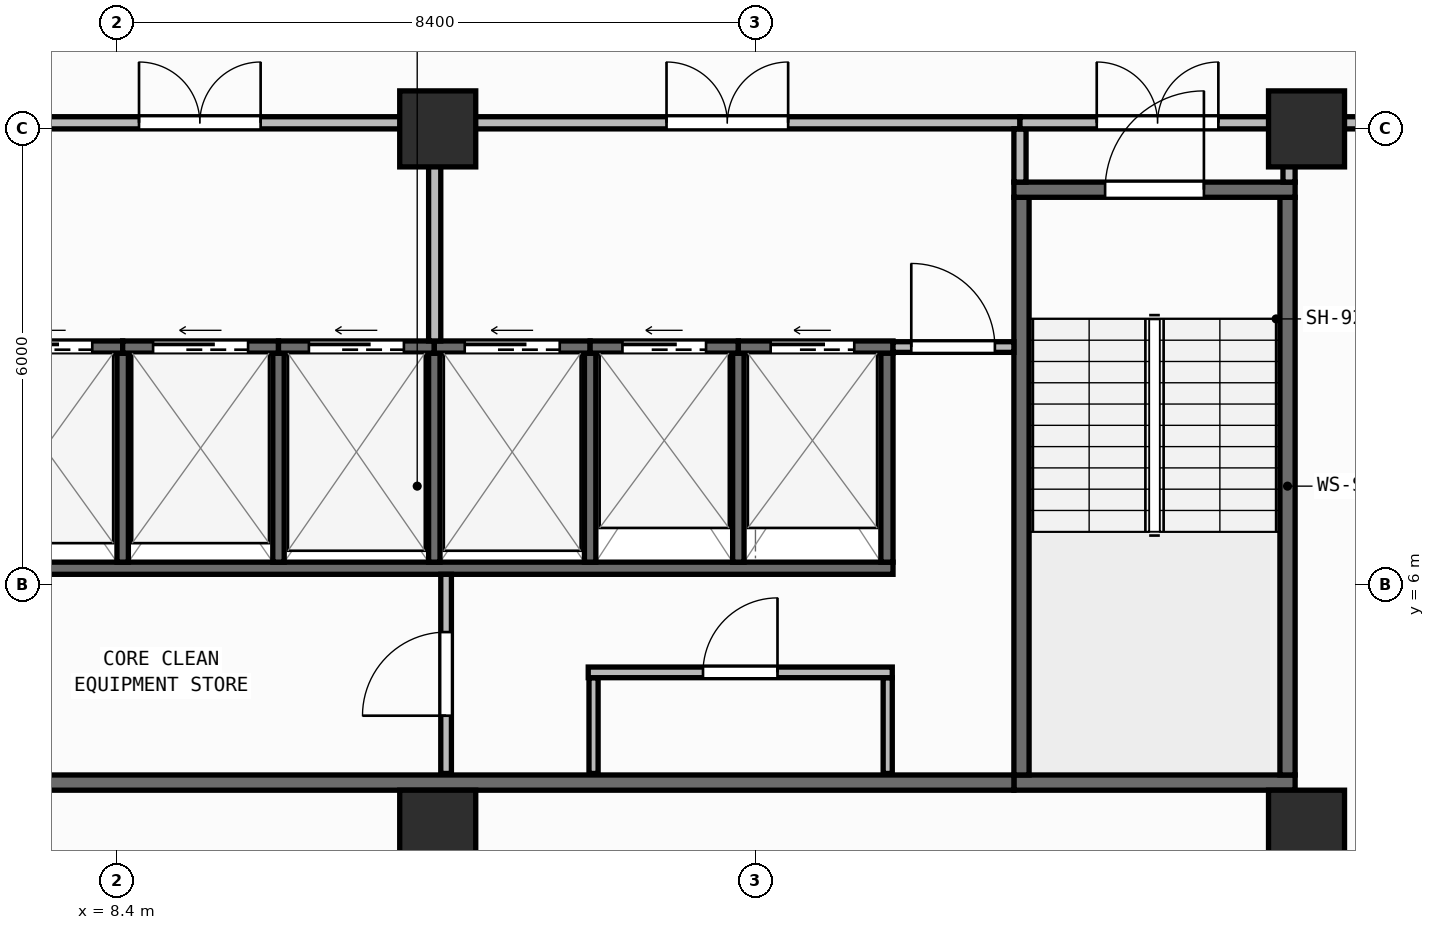
"""IFC4 building model, lengths in metres.
Left out: names, types, materials, properties, quantities, classifications, styles, units other than length and angle.
Written with IfcOpenShell. Run it as: python <this file> out.ifc"""

import sys

from ifc_helpers import new_model, si_unit, direction, frame, frame_2d, origin, origin_2d, place, context, subcontext, project, spatial, rectangle, extrude, element, fill, save


model = new_model("IFC4")
c1 = context("Model", 3, precision=1e-05, world=origin(), true_north=direction((0.0, 1.0)))
c2 = subcontext(c1, "Body", "Model", "MODEL_VIEW")
j1 = project(units=[si_unit("LENGTHUNIT", "METRE"), si_unit("PLANEANGLEUNIT", "RADIAN")], contexts=[c1])
p1 = place(None, origin())
s1 = spatial("IfcSite", under=j1, at=p1, CompositionType="ELEMENT")
p2 = place(p1, origin())
s2 = spatial("IfcBuilding", under=s1, at=p2, CompositionType="ELEMENT")
p3 = place(p2, frame((0.0, 0.0, 219.75)))
s3 = spatial("IfcBuildingStorey", under=s2, at=p3, CompositionType="ELEMENT", Elevation=219.75)
for number, where, z_axis, x_axis in (
    (1, (12.62, 2.8, 0.0), (0.0, 0.0, 1.0), (1.0, 0.0, 0.0)),
    (2, (24.05, 2.8, 0.0), (0.0, 0.0, 1.0), (1.0, 0.0, 0.0)),
    (3, (12.62, 12.0, 0.0), (0.0, 0.0, 1.0), (1.0, 0.0, 0.0)),
    (4, (24.05, 12.0, 0.0), (0.0, 0.0, 1.0), (1.0, 0.0, 0.0)),
):
    element("IfcColumn", number, at=place(p3, frame(where, z_axis=z_axis, x_axis=x_axis)), inside=s3, PredefinedType="COLUMN", context=c2, shape_type="SweptSolid", body=[
        extrude(rectangle(XDim=1.0, YDim=1.0, at=origin_2d()), origin(), (0.0, 0.0, 1.0), 3.95),
    ])
p4 = place(p3, frame((2.66, 0.174, 0.0), z_axis=(0.0, 0.0, 1.0), x_axis=(0.996634028439, 0.081979347142, 0.0)))
e5 = element("IfcWall", 5, at=p4, inside=s3, PredefinedType="STANDARD", context=c2, shape_type="SweptSolid", body=[
    extrude(rectangle(XDim=46.035, YDim=0.26, at=frame_2d((23.018, 0.0))), origin(), (0.0, 0.0, 1.0), 3.71),
])
p5 = place(p4, frame((21.817, 0.0, 0.9)))
e6 = element("IfcOpeningElement", 6, at=p5, cuts=e5, PredefinedType="OPENING", context=c2, shape_type="SweptSolid", body=[
    extrude(rectangle(XDim=2.4, YDim=1.65, at=frame_2d((1.2, 0.825))), frame((0.0, 0.14, 0.0), z_axis=(0.0, -1.0, 0.0), x_axis=(1.0, 0.0, 0.0)), (0.0, 0.0, 1.0), 0.28),
])
p6 = place(p3, frame((20.2, 3.4, 0.0), z_axis=(0.0, 0.0, 1.0), x_axis=(1.0, 0.0, 0.0)))
e7 = element("IfcWall", 7, at=p6, inside=s3, PredefinedType="SHEAR", context=c2, shape_type="SweptSolid", body=[
    extrude(rectangle(XDim=3.7, YDim=0.2, at=frame_2d((1.85, 0.0))), origin(), (0.0, 0.0, 1.0), 3.71),
])
for number, where, z_axis, x_axis in (
    (8, (20.3, 3.5, 0.0), (0.0, 0.0, 1.0), (0.0, 1.0, 0.0)),
    (9, (23.8, 3.5, 0.0), (0.0, 0.0, 1.0), (0.0, 1.0, 0.0)),
):
    element("IfcWall", number, at=place(p3, frame(where, z_axis=z_axis, x_axis=x_axis)), inside=s3, PredefinedType="SHEAR", context=c2, shape_type="SweptSolid", body=[
        extrude(rectangle(XDim=7.6, YDim=0.2, at=frame_2d((3.8, 0.0))), origin(), (0.0, 0.0, 1.0), 3.71),
    ])
p7 = place(p3, frame((20.2, 11.2, 0.0), z_axis=(0.0, 0.0, 1.0), x_axis=(1.0, 0.0, 0.0)))
e10 = element("IfcWall", 10, at=p7, inside=s3, PredefinedType="SHEAR", context=c2, shape_type="SweptSolid", body=[
    extrude(rectangle(XDim=3.7, YDim=0.2, at=frame_2d((1.85, 0.0))), origin(), (0.0, 0.0, 1.0), 3.71),
])
p8 = place(p7, frame((1.2, 0.0, 0.0)))
e11 = element("IfcOpeningElement", 11, at=p8, cuts=e10, PredefinedType="OPENING", context=c2, shape_type="SweptSolid", body=[
    extrude(rectangle(XDim=1.3, YDim=2.15, at=frame_2d((0.65, 1.075))), frame((0.0, 0.11, 0.0), z_axis=(0.0, -1.0, 0.0), x_axis=(1.0, 0.0, 0.0)), (0.0, 0.0, 1.0), 0.22),
])
p9 = place(p3, frame((6.5, 3.4, 0.0), z_axis=(0.0, 0.0, 1.0), x_axis=(1.0, 0.0, 0.0)))
e12 = element("IfcWall", 12, at=p9, inside=s3, PredefinedType="SHEAR", context=c2, shape_type="SweptSolid", body=[
    extrude(rectangle(XDim=13.7, YDim=0.2, at=frame_2d((6.85, 0.0))), origin(), (0.0, 0.0, 1.0), 3.71),
])
p10 = place(p3, frame((6.5, 6.22, 0.0), z_axis=(0.0, 0.0, 1.0), x_axis=(1.0, 0.0, 0.0)))
e13 = element("IfcWall", 13, at=p10, inside=s3, PredefinedType="SHEAR", context=c2, shape_type="SweptSolid", body=[
    extrude(rectangle(XDim=12.11, YDim=0.16, at=frame_2d((6.055, 0.0))), origin(), (0.0, 0.0, 1.0), 3.71),
])
p11 = place(p3, frame((18.53, 6.3, 0.0), z_axis=(0.0, 0.0, 1.0), x_axis=(0.0, 1.0, 0.0)))
e14 = element("IfcWall", 14, at=p11, inside=s3, PredefinedType="SHEAR", context=c2, shape_type="SweptSolid", body=[
    extrude(rectangle(XDim=2.75, YDim=0.16, at=frame_2d((1.375, 0.0))), origin(), (0.0, 0.0, 1.0), 3.71),
])
for number, where, z_axis, x_axis in (
    (15, (8.475, 6.3, 0.0), (0.0, 0.0, 1.0), (0.0, 1.0, 0.0)),
    (16, (10.525, 6.3, 0.0), (0.0, 0.0, 1.0), (0.0, 1.0, 0.0)),
    (17, (12.575, 6.3, 0.0), (0.0, 0.0, 1.0), (0.0, 1.0, 0.0)),
    (18, (14.625, 6.3, 0.0), (0.0, 0.0, 1.0), (0.0, 1.0, 0.0)),
    (19, (16.575, 6.3, 0.0), (0.0, 0.0, 1.0), (0.0, 1.0, 0.0)),
):
    element("IfcWall", number, at=place(p3, frame(where, z_axis=z_axis, x_axis=x_axis)), inside=s3, PredefinedType="SHEAR", context=c2, shape_type="SweptSolid", body=[
        extrude(rectangle(XDim=2.75, YDim=0.15, at=frame_2d((1.375, 0.0))), origin(), (0.0, 0.0, 1.0), 3.71),
    ])
p12 = place(p3, frame((6.5, 9.13, 0.0), z_axis=(0.0, 0.0, 1.0), x_axis=(1.0, 0.0, 0.0)))
e20 = element("IfcWall", 20, at=p12, inside=s3, PredefinedType="SHEAR", context=c2, shape_type="SweptSolid", body=[
    extrude(rectangle(XDim=1.975, YDim=0.16, at=frame_2d((0.988, 0.0))), origin(), (0.0, 0.0, 1.0), 3.71),
])
p13 = place(p12, frame((0.325, 0.0, 0.0)))
e21 = element("IfcOpeningElement", 21, at=p13, cuts=e20, PredefinedType="OPENING", context=c2, shape_type="SweptSolid", body=[
    extrude(rectangle(XDim=1.25, YDim=2.15, at=frame_2d((0.625, 1.075))), frame((0.0, 0.09, 0.0), z_axis=(0.0, -1.0, 0.0), x_axis=(1.0, 0.0, 0.0)), (0.0, 0.0, 1.0), 0.18),
])
p14 = place(p3, frame((8.475, 9.13, 0.0), z_axis=(0.0, 0.0, 1.0), x_axis=(1.0, 0.0, 0.0)))
e22 = element("IfcWall", 22, at=p14, inside=s3, PredefinedType="SHEAR", context=c2, shape_type="SweptSolid", body=[
    extrude(rectangle(XDim=2.05, YDim=0.16, at=frame_2d((1.025, 0.0))), origin(), (0.0, 0.0, 1.0), 3.71),
])
p15 = place(p14, frame((0.4, 0.0, 0.0)))
e23 = element("IfcOpeningElement", 23, at=p15, cuts=e22, PredefinedType="OPENING", context=c2, shape_type="SweptSolid", body=[
    extrude(rectangle(XDim=1.25, YDim=2.15, at=frame_2d((0.625, 1.075))), frame((0.0, 0.09, 0.0), z_axis=(0.0, -1.0, 0.0), x_axis=(1.0, 0.0, 0.0)), (0.0, 0.0, 1.0), 0.18),
])
p16 = place(p3, frame((10.525, 9.13, 0.0), z_axis=(0.0, 0.0, 1.0), x_axis=(1.0, 0.0, 0.0)))
e24 = element("IfcWall", 24, at=p16, inside=s3, PredefinedType="SHEAR", context=c2, shape_type="SweptSolid", body=[
    extrude(rectangle(XDim=2.05, YDim=0.16, at=frame_2d((1.025, 0.0))), origin(), (0.0, 0.0, 1.0), 3.71),
])
p17 = place(p16, frame((0.4, 0.0, 0.0)))
e25 = element("IfcOpeningElement", 25, at=p17, cuts=e24, PredefinedType="OPENING", context=c2, shape_type="SweptSolid", body=[
    extrude(rectangle(XDim=1.25, YDim=2.15, at=frame_2d((0.625, 1.075))), frame((0.0, 0.09, 0.0), z_axis=(0.0, -1.0, 0.0), x_axis=(1.0, 0.0, 0.0)), (0.0, 0.0, 1.0), 0.18),
])
p18 = place(p3, frame((12.575, 9.13, 0.0), z_axis=(0.0, 0.0, 1.0), x_axis=(1.0, 0.0, 0.0)))
e26 = element("IfcWall", 26, at=p18, inside=s3, PredefinedType="SHEAR", context=c2, shape_type="SweptSolid", body=[
    extrude(rectangle(XDim=2.05, YDim=0.16, at=frame_2d((1.025, 0.0))), origin(), (0.0, 0.0, 1.0), 3.71),
])
p19 = place(p18, frame((0.4, 0.0, 0.0)))
e27 = element("IfcOpeningElement", 27, at=p19, cuts=e26, PredefinedType="OPENING", context=c2, shape_type="SweptSolid", body=[
    extrude(rectangle(XDim=1.25, YDim=2.15, at=frame_2d((0.625, 1.075))), frame((0.0, 0.09, 0.0), z_axis=(0.0, -1.0, 0.0), x_axis=(1.0, 0.0, 0.0)), (0.0, 0.0, 1.0), 0.18),
])
p20 = place(p3, frame((14.625, 9.13, 0.0), z_axis=(0.0, 0.0, 1.0), x_axis=(1.0, 0.0, 0.0)))
e28 = element("IfcWall", 28, at=p20, inside=s3, PredefinedType="SHEAR", context=c2, shape_type="SweptSolid", body=[
    extrude(rectangle(XDim=1.95, YDim=0.16, at=frame_2d((0.975, 0.0))), origin(), (0.0, 0.0, 1.0), 3.71),
])
p21 = place(p20, frame((0.425, 0.0, 0.0)))
e29 = element("IfcOpeningElement", 29, at=p21, cuts=e28, PredefinedType="OPENING", context=c2, shape_type="SweptSolid", body=[
    extrude(rectangle(XDim=1.1, YDim=2.15, at=frame_2d((0.55, 1.075))), frame((0.0, 0.09, 0.0), z_axis=(0.0, -1.0, 0.0), x_axis=(1.0, 0.0, 0.0)), (0.0, 0.0, 1.0), 0.18),
])
p22 = place(p3, frame((16.575, 9.13, 0.0), z_axis=(0.0, 0.0, 1.0), x_axis=(1.0, 0.0, 0.0)))
e30 = element("IfcWall", 30, at=p22, inside=s3, PredefinedType="SHEAR", context=c2, shape_type="SweptSolid", body=[
    extrude(rectangle(XDim=2.035, YDim=0.16, at=frame_2d((1.018, 0.0))), origin(), (0.0, 0.0, 1.0), 3.71),
])
p23 = place(p22, frame((0.425, 0.0, 0.0)))
e31 = element("IfcOpeningElement", 31, at=p23, cuts=e30, PredefinedType="OPENING", context=c2, shape_type="SweptSolid", body=[
    extrude(rectangle(XDim=1.1, YDim=2.15, at=frame_2d((0.55, 1.075))), frame((0.0, 0.09, 0.0), z_axis=(0.0, -1.0, 0.0), x_axis=(1.0, 0.0, 0.0)), (0.0, 0.0, 1.0), 0.18),
])
p24 = place(p3, frame((12.73, 3.52, 0.0), z_axis=(0.0, 0.0, 1.0), x_axis=(0.0, 1.0, 0.0)))
e32 = element("IfcWall", 32, at=p24, inside=s3, PredefinedType="PARTITIONING", context=c2, shape_type="SweptSolid", body=[
    extrude(rectangle(XDim=2.62, YDim=0.14, at=frame_2d((1.31, 0.0))), origin(), (0.0, 0.0, 1.0), 3.71),
])
p25 = place(p24, frame((0.76, 0.0, 0.0)))
e33 = element("IfcOpeningElement", 33, at=p25, cuts=e32, PredefinedType="OPENING", context=c2, shape_type="SweptSolid", body=[
    extrude(rectangle(XDim=1.1, YDim=2.1, at=frame_2d((0.55, 1.05))), frame((0.0, 0.08, 0.0), z_axis=(0.0, -1.0, 0.0), x_axis=(1.0, 0.0, 0.0)), (0.0, 0.0, 1.0), 0.16),
])
for number, where, z_axis, x_axis in (
    (34, (14.67, 3.52, 0.0), (0.0, 0.0, 1.0), (0.0, 1.0, 0.0)),
    (35, (18.54, 3.52, 0.0), (0.0, 0.0, 1.0), (0.0, 1.0, 0.0)),
):
    element("IfcWall", number, at=place(p3, frame(where, z_axis=z_axis, x_axis=x_axis)), inside=s3, PredefinedType="PARTITIONING", context=c2, shape_type="SweptSolid", body=[
        extrude(rectangle(XDim=1.26, YDim=0.12, at=frame_2d((0.63, 0.0))), origin(), (0.0, 0.0, 1.0), 3.71),
    ])
p26 = place(p3, frame((14.6, 4.85, 0.0), z_axis=(0.0, 0.0, 1.0), x_axis=(1.0, 0.0, 0.0)))
e36 = element("IfcWall", 36, at=p26, inside=s3, PredefinedType="PARTITIONING", context=c2, shape_type="SweptSolid", body=[
    extrude(rectangle(XDim=4.0, YDim=0.14, at=frame_2d((2.0, 0.0))), origin(), (0.0, 0.0, 1.0), 3.71),
])
p27 = place(p26, frame((1.51, 0.0, 0.0)))
e37 = element("IfcOpeningElement", 37, at=p27, cuts=e36, PredefinedType="OPENING", context=c2, shape_type="SweptSolid", body=[
    extrude(rectangle(XDim=0.98, YDim=2.1, at=frame_2d((0.49, 1.05))), frame((0.0, 0.08, 0.0), z_axis=(0.0, -1.0, 0.0), x_axis=(1.0, 0.0, 0.0)), (0.0, 0.0, 1.0), 0.16),
])
p28 = place(p3, frame((18.61, 9.13, 0.0), z_axis=(0.0, 0.0, 1.0), x_axis=(1.0, 0.0, 0.0)))
e38 = element("IfcWall", 38, at=p28, inside=s3, PredefinedType="PARTITIONING", context=c2, shape_type="SweptSolid", body=[
    extrude(rectangle(XDim=1.59, YDim=0.14, at=frame_2d((0.795, 0.0))), origin(), (0.0, 0.0, 1.0), 3.71),
])
p29 = place(p28, frame((0.24, 0.0, 0.0)))
e39 = element("IfcOpeningElement", 39, at=p29, cuts=e38, PredefinedType="OPENING", context=c2, shape_type="SweptSolid", body=[
    extrude(rectangle(XDim=1.1, YDim=2.1, at=frame_2d((0.55, 1.05))), frame((0.0, 0.08, 0.0), z_axis=(0.0, -1.0, 0.0), x_axis=(1.0, 0.0, 0.0)), (0.0, 0.0, 1.0), 0.16),
])
p30 = place(p3, frame((6.4, 12.08, 0.0), z_axis=(0.0, 0.0, 1.0), x_axis=(1.0, 0.0, 0.0)))
e40 = element("IfcWall", 40, at=p30, inside=s3, PredefinedType="PARTITIONING", context=c2, shape_type="SweptSolid", body=[
    extrude(rectangle(XDim=6.18, YDim=0.16, at=frame_2d((3.09, 0.0))), origin(), (0.0, 0.0, 1.0), 3.152),
])
p31 = place(p30, frame((2.29, 0.0, 0.0)))
e41 = element("IfcOpeningElement", 41, at=p31, cuts=e40, PredefinedType="OPENING", context=c2, shape_type="SweptSolid", body=[
    extrude(rectangle(XDim=1.6, YDim=2.05, at=frame_2d((0.8, 1.025))), frame((0.0, 0.09, 0.0), z_axis=(0.0, -1.0, 0.0), x_axis=(1.0, 0.0, 0.0)), (0.0, 0.0, 1.0), 0.18),
])
p32 = place(p3, frame((12.58, 9.21, 0.0), z_axis=(0.0, 0.0, 1.0), x_axis=(0.0, 1.0, 0.0)))
e42 = element("IfcWall", 42, at=p32, inside=s3, PredefinedType="PARTITIONING", context=c2, shape_type="SweptSolid", body=[
    extrude(rectangle(XDim=2.79, YDim=0.16, at=frame_2d((1.395, 0.0))), origin(), (0.0, 0.0, 1.0), 3.71),
])
p33 = place(p3, frame((12.58, 12.08, 0.0), z_axis=(0.0, 0.0, 1.0), x_axis=(1.0, 0.0, 0.0)))
e43 = element("IfcWall", 43, at=p33, inside=s3, PredefinedType="PARTITIONING", context=c2, shape_type="SweptSolid", body=[
    extrude(rectangle(XDim=7.7, YDim=0.16, at=frame_2d((3.85, 0.0))), origin(), (0.0, 0.0, 1.0), 3.152),
])
p34 = place(p33, frame((3.05, 0.0, 0.0)))
e44 = element("IfcOpeningElement", 44, at=p34, cuts=e43, PredefinedType="OPENING", context=c2, shape_type="SweptSolid", body=[
    extrude(rectangle(XDim=1.6, YDim=2.05, at=frame_2d((0.8, 1.025))), frame((0.0, 0.09, 0.0), z_axis=(0.0, -1.0, 0.0), x_axis=(1.0, 0.0, 0.0)), (0.0, 0.0, 1.0), 0.18),
])
p35 = place(p3, frame((20.28, 11.3, 0.0), z_axis=(0.0, 0.0, 1.0), x_axis=(0.0, 1.0, 0.0)))
e45 = element("IfcWall", 45, at=p35, inside=s3, PredefinedType="PARTITIONING", context=c2, shape_type="SweptSolid", body=[
    extrude(rectangle(XDim=0.7, YDim=0.16, at=frame_2d((0.35, 0.0))), origin(), (0.0, 0.0, 1.0), 3.71),
])
p36 = place(p3, frame((20.28, 12.08, 0.0), z_axis=(0.0, 0.0, 1.0), x_axis=(1.0, 0.0, 0.0)))
e46 = element("IfcWall", 46, at=p36, inside=s3, PredefinedType="PARTITIONING", context=c2, shape_type="SweptSolid", body=[
    extrude(rectangle(XDim=3.62, YDim=0.16, at=frame_2d((1.81, 0.0))), origin(), (0.0, 0.0, 1.0), 3.152),
])
p37 = place(p36, frame((1.01, 0.0, 0.0)))
e47 = element("IfcOpeningElement", 47, at=p37, cuts=e46, PredefinedType="OPENING", context=c2, shape_type="SweptSolid", body=[
    extrude(rectangle(XDim=1.6, YDim=2.05, at=frame_2d((0.8, 1.025))), frame((0.0, 0.09, 0.0), z_axis=(0.0, -1.0, 0.0), x_axis=(1.0, 0.0, 0.0)), (0.0, 0.0, 1.0), 0.18),
])
p38 = place(p3, frame((23.82, 11.3, 0.0), z_axis=(0.0, 0.0, 1.0), x_axis=(0.0, 1.0, 0.0)))
e48 = element("IfcWall", 48, at=p38, inside=s3, PredefinedType="PARTITIONING", context=c2, shape_type="SweptSolid", body=[
    extrude(rectangle(XDim=0.7, YDim=0.16, at=frame_2d((0.35, 0.0))), origin(), (0.0, 0.0, 1.0), 3.71),
])
p39 = place(p3, frame((24.02, 12.08, 0.0), z_axis=(0.0, 0.0, 1.0), x_axis=(1.0, 0.0, 0.0)))
e49 = element("IfcWall", 49, at=p39, inside=s3, PredefinedType="PARTITIONING", context=c2, shape_type="SweptSolid", body=[
    extrude(rectangle(XDim=1.219, YDim=0.16, at=frame_2d((0.609, 0.0))), origin(), (0.0, 0.0, 1.0), 3.152),
])
p40 = place(p8, origin())
e50 = element("IfcDoor", 50, at=p40, inside=s3, OperationType="SINGLE_SWING_RIGHT", PredefinedType="DOOR", context=c2, shape_type="SweptSolid", body=[
    extrude(rectangle(XDim=1.3, YDim=2.15, at=frame_2d((0.65, 1.075))), frame((0.0, 0.025, 0.0), z_axis=(0.0, -1.0, 0.0), x_axis=(1.0, 0.0, 0.0)), (0.0, 0.0, 1.0), 0.05),
])
fill(e11, e50)
p41 = place(p13, origin())
e51 = element("IfcDoor", 51, at=p41, inside=s3, OperationType="SLIDING_TO_LEFT", PredefinedType="DOOR", context=c2, shape_type="SweptSolid", body=[
    extrude(rectangle(XDim=1.25, YDim=2.15, at=frame_2d((0.625, 1.075))), frame((0.0, 0.025, 0.0), z_axis=(0.0, -1.0, 0.0), x_axis=(1.0, 0.0, 0.0)), (0.0, 0.0, 1.0), 0.05),
])
fill(e21, e51)
p42 = place(p15, origin())
e52 = element("IfcDoor", 52, at=p42, inside=s3, OperationType="SLIDING_TO_LEFT", PredefinedType="DOOR", context=c2, shape_type="SweptSolid", body=[
    extrude(rectangle(XDim=1.25, YDim=2.15, at=frame_2d((0.625, 1.075))), frame((0.0, 0.025, 0.0), z_axis=(0.0, -1.0, 0.0), x_axis=(1.0, 0.0, 0.0)), (0.0, 0.0, 1.0), 0.05),
])
fill(e23, e52)
p43 = place(p17, origin())
e53 = element("IfcDoor", 53, at=p43, inside=s3, OperationType="SLIDING_TO_LEFT", PredefinedType="DOOR", context=c2, shape_type="SweptSolid", body=[
    extrude(rectangle(XDim=1.25, YDim=2.15, at=frame_2d((0.625, 1.075))), frame((0.0, 0.025, 0.0), z_axis=(0.0, -1.0, 0.0), x_axis=(1.0, 0.0, 0.0)), (0.0, 0.0, 1.0), 0.05),
])
fill(e25, e53)
p44 = place(p19, origin())
e54 = element("IfcDoor", 54, at=p44, inside=s3, OperationType="SLIDING_TO_LEFT", PredefinedType="DOOR", context=c2, shape_type="SweptSolid", body=[
    extrude(rectangle(XDim=1.25, YDim=2.15, at=frame_2d((0.625, 1.075))), frame((0.0, 0.025, 0.0), z_axis=(0.0, -1.0, 0.0), x_axis=(1.0, 0.0, 0.0)), (0.0, 0.0, 1.0), 0.05),
])
fill(e27, e54)
p45 = place(p21, origin())
e55 = element("IfcDoor", 55, at=p45, inside=s3, OperationType="SLIDING_TO_LEFT", PredefinedType="DOOR", context=c2, shape_type="SweptSolid", body=[
    extrude(rectangle(XDim=1.1, YDim=2.15, at=frame_2d((0.55, 1.075))), frame((0.0, 0.025, 0.0), z_axis=(0.0, -1.0, 0.0), x_axis=(1.0, 0.0, 0.0)), (0.0, 0.0, 1.0), 0.05),
])
fill(e29, e55)
p46 = place(p23, origin())
e56 = element("IfcDoor", 56, at=p46, inside=s3, OperationType="SLIDING_TO_LEFT", PredefinedType="DOOR", context=c2, shape_type="SweptSolid", body=[
    extrude(rectangle(XDim=1.1, YDim=2.15, at=frame_2d((0.55, 1.075))), frame((0.0, 0.025, 0.0), z_axis=(0.0, -1.0, 0.0), x_axis=(1.0, 0.0, 0.0)), (0.0, 0.0, 1.0), 0.05),
])
fill(e31, e56)
p47 = place(p25, origin())
e57 = element("IfcDoor", 57, at=p47, inside=s3, OperationType="SINGLE_SWING_LEFT", PredefinedType="DOOR", context=c2, shape_type="SweptSolid", body=[
    extrude(rectangle(XDim=1.1, YDim=2.1, at=frame_2d((0.55, 1.05))), frame((0.0, 0.025, 0.0), z_axis=(0.0, -1.0, 0.0), x_axis=(1.0, 0.0, 0.0)), (0.0, 0.0, 1.0), 0.05),
])
fill(e33, e57)
p48 = place(p27, origin())
e58 = element("IfcDoor", 58, at=p48, inside=s3, OperationType="SINGLE_SWING_RIGHT", PredefinedType="DOOR", context=c2, shape_type="SweptSolid", body=[
    extrude(rectangle(XDim=0.98, YDim=2.1, at=frame_2d((0.49, 1.05))), frame((0.0, 0.025, 0.0), z_axis=(0.0, -1.0, 0.0), x_axis=(1.0, 0.0, 0.0)), (0.0, 0.0, 1.0), 0.05),
])
fill(e37, e58)
p49 = place(p29, origin())
e59 = element("IfcDoor", 59, at=p49, inside=s3, OperationType="SINGLE_SWING_LEFT", PredefinedType="DOOR", context=c2, shape_type="SweptSolid", body=[
    extrude(rectangle(XDim=1.1, YDim=2.1, at=frame_2d((0.55, 1.05))), frame((0.0, 0.025, 0.0), z_axis=(0.0, -1.0, 0.0), x_axis=(1.0, 0.0, 0.0)), (0.0, 0.0, 1.0), 0.05),
])
fill(e39, e59)
p50 = place(p31, origin())
e60 = element("IfcDoor", 60, at=p50, inside=s3, OperationType="DOUBLE_DOOR_SINGLE_SWING", PredefinedType="DOOR", context=c2, shape_type="SweptSolid", body=[
    extrude(rectangle(XDim=1.6, YDim=2.05, at=frame_2d((0.8, 1.025))), frame((0.0, 0.025, 0.0), z_axis=(0.0, -1.0, 0.0), x_axis=(1.0, 0.0, 0.0)), (0.0, 0.0, 1.0), 0.05),
])
fill(e41, e60)
p51 = place(p34, origin())
e61 = element("IfcDoor", 61, at=p51, inside=s3, OperationType="DOUBLE_DOOR_SINGLE_SWING", PredefinedType="DOOR", context=c2, shape_type="SweptSolid", body=[
    extrude(rectangle(XDim=1.6, YDim=2.05, at=frame_2d((0.8, 1.025))), frame((0.0, 0.025, 0.0), z_axis=(0.0, -1.0, 0.0), x_axis=(1.0, 0.0, 0.0)), (0.0, 0.0, 1.0), 0.05),
])
fill(e44, e61)
p52 = place(p37, origin())
e62 = element("IfcDoor", 62, at=p52, inside=s3, OperationType="DOUBLE_DOOR_SINGLE_SWING", PredefinedType="DOOR", context=c2, shape_type="SweptSolid", body=[
    extrude(rectangle(XDim=1.6, YDim=2.05, at=frame_2d((0.8, 1.025))), frame((0.0, 0.025, 0.0), z_axis=(0.0, -1.0, 0.0), x_axis=(1.0, 0.0, 0.0)), (0.0, 0.0, 1.0), 0.05),
])
fill(e47, e62)
save(model, sys.argv[1])
